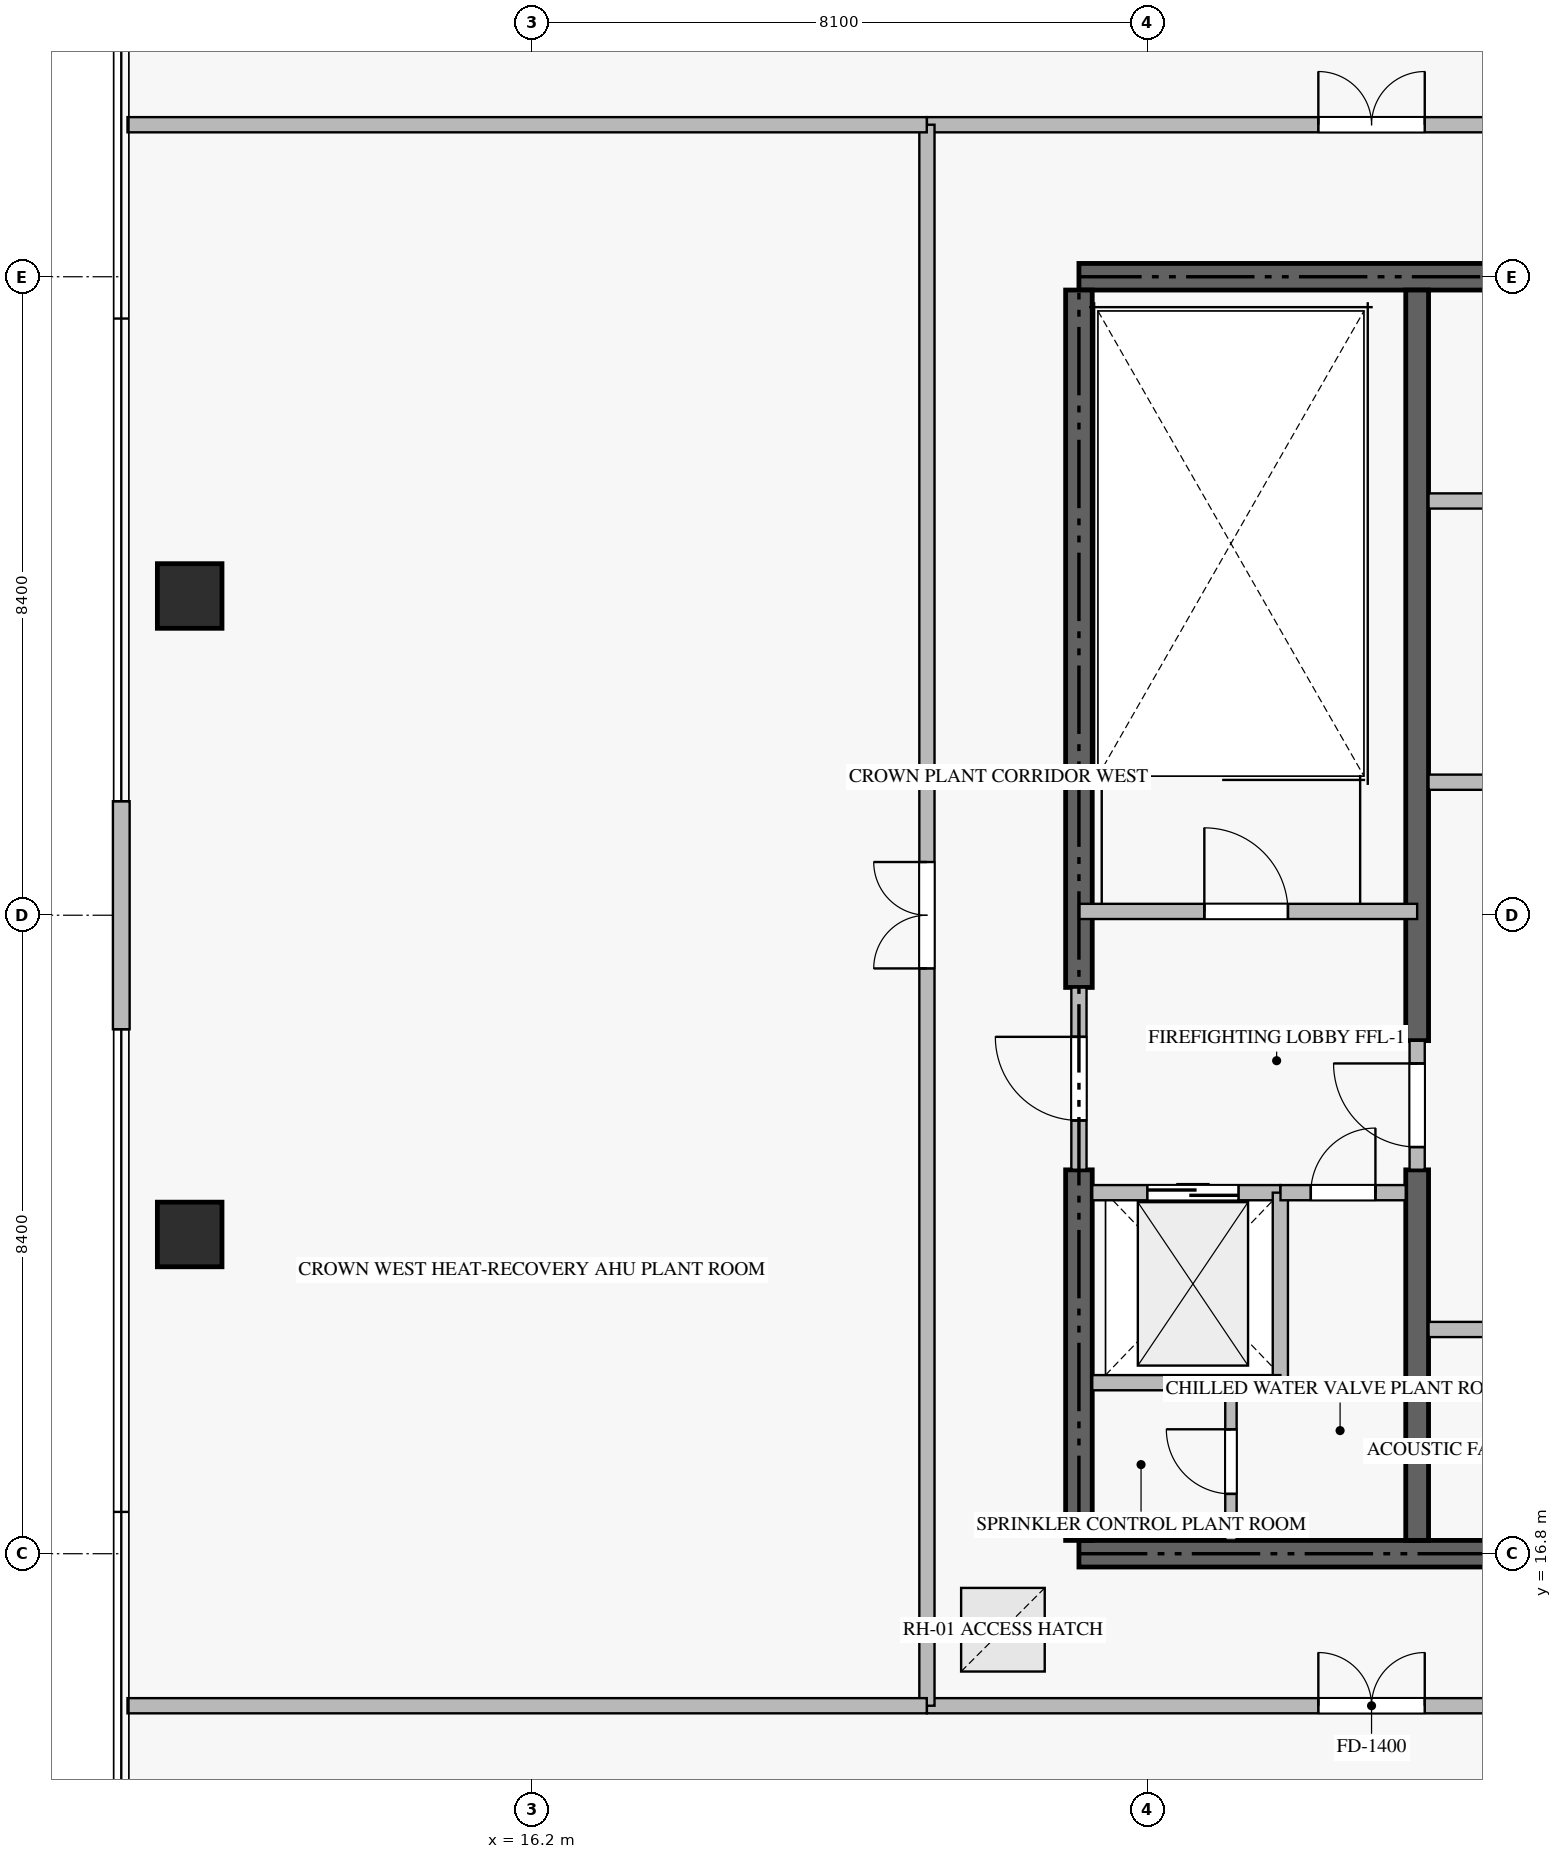
"""IFC4 building model, lengths in metres.
Left out: names, types, materials, properties, quantities, classifications, styles, units other than length and angle.
Written with IfcOpenShell. Run it as: python <this file> out.ifc"""

import sys

from ifc_helpers import new_model, si_unit, direction, frame, frame_2d, origin, origin_2d, place, context, subcontext, project, spatial, rectangle, extrude, source, transform, mapped, element, fill, save


model = new_model("IFC4")
c1 = context("Model", 3, precision=1e-05, world=origin(), true_north=direction((0.0, 1.0)))
c2 = subcontext(c1, "Body", "Model", "MODEL_VIEW")
j1 = project(units=[si_unit("LENGTHUNIT", "METRE"), si_unit("PLANEANGLEUNIT", "RADIAN")], contexts=[c1])
p1 = place(None, origin())
s1 = spatial("IfcSite", under=j1, at=p1, CompositionType="ELEMENT")
p2 = place(p1, origin())
s2 = spatial("IfcBuilding", under=s1, at=p2, CompositionType="ELEMENT")
p3 = place(p2, frame((0.0, 0.0, 365.75)))
s3 = spatial("IfcBuildingStorey", under=s2, at=p3, CompositionType="ELEMENT", Elevation=365.75)
for number, where, z_axis, x_axis in (
    (1, (23.4, 16.8, -0.36), (0.0, 0.0, 1.0), (1.0, 0.0, 0.0)),
    (2, (41.4, 33.6, -0.36), (0.0, 0.0, 1.0), (-1.0, 0.0, 0.0)),
):
    element("IfcWall", number, at=place(p3, frame(where, z_axis=z_axis, x_axis=x_axis)), inside=s3, PredefinedType="SHEAR", context=c2, shape_type="SweptSolid", body=[
        extrude(rectangle(XDim=18.0, YDim=0.35, at=frame_2d((9.0, 0.0))), origin(), (0.0, 0.0, 1.0), 5.258),
    ])
p4 = place(p3, frame((23.4, 16.975, -0.36), z_axis=(0.0, 0.0, 1.0), x_axis=(0.0, 1.0, 0.0)))
e3 = element("IfcWall", 3, at=p4, inside=s3, PredefinedType="SHEAR", context=c2, shape_type="SweptSolid", body=[
    extrude(rectangle(XDim=4.875, YDim=0.35, at=frame_2d((2.438, 0.0))), origin(), (0.0, 0.0, 1.0), 5.258),
])
p5 = place(p3, frame((23.4, 24.25, -0.36), z_axis=(0.0, 0.0, 1.0), x_axis=(0.0, 1.0, 0.0)))
e4 = element("IfcWall", 4, at=p5, inside=s3, PredefinedType="SHEAR", context=c2, shape_type="SweptSolid", body=[
    extrude(rectangle(XDim=9.175, YDim=0.35, at=frame_2d((4.587, 0.0))), origin(), (0.0, 0.0, 1.0), 5.258),
])
p6 = place(p3, frame((27.85, 16.975, -0.36), z_axis=(0.0, 0.0, 1.0), x_axis=(0.0, 1.0, 0.0)))
e5 = element("IfcWall", 5, at=p6, inside=s3, PredefinedType="SHEAR", context=c2, shape_type="SweptSolid", body=[
    extrude(rectangle(XDim=4.875, YDim=0.3, at=frame_2d((2.438, 0.0))), origin(), (0.0, 0.0, 1.0), 5.258),
])
p7 = place(p3, frame((27.85, 23.55, -0.36), z_axis=(0.0, 0.0, 1.0), x_axis=(0.0, 1.0, 0.0)))
e6 = element("IfcWall", 6, at=p7, inside=s3, PredefinedType="SHEAR", context=c2, shape_type="SweptSolid", body=[
    extrude(rectangle(XDim=9.875, YDim=0.3, at=frame_2d((4.938, 0.0))), origin(), (0.0, 0.0, 1.0), 5.258),
])
m1 = source(origin(), c2, "Body", "SweptSolid", [
    extrude(rectangle(XDim=0.85, YDim=0.85, at=origin_2d()), origin(), (0.0, 0.0, 1.0), 5.26),
])
for number, where, z_axis, x_axis in (
    (7, (11.7, 21.0, -0.36), (0.0, 0.0, 1.0), (1.0, 0.0, 0.0)),
    (8, (11.7, 29.4, -0.36), (0.0, 0.0, 1.0), (1.0, 0.0, 0.0)),
):
    element("IfcColumn", number, at=place(p3, frame(where, z_axis=z_axis, x_axis=x_axis)), inside=s3, PredefinedType="COLUMN", context=c2, shape_type="MappedRepresentation", body=[
        mapped(m1, transform((0.0, 0.0, 0.0), scale=1.0)),
    ])
p8 = place(p3, frame((10.8, 26.7, 0.0), z_axis=(0.0, 0.0, 1.0), x_axis=(0.0, -1.0, 0.0)))
e9 = element("IfcWall", 9, at=p8, inside=s3, PredefinedType="ELEMENTEDWALL", context=c2, shape_type="SweptSolid", body=[
    extrude(rectangle(XDim=3.0, YDim=0.22, at=frame_2d((1.5, 0.0))), origin(), (0.0, 0.0, 1.0), 4.885),
])
p9 = place(p3, frame((23.4, 25.25, 0.0), z_axis=(0.0, 0.0, 1.0), x_axis=(1.0, 0.0, 0.0)))
e10 = element("IfcWall", 10, at=p9, inside=s3, PredefinedType="STANDARD", context=c2, shape_type="SweptSolid", body=[
    extrude(rectangle(XDim=4.45, YDim=0.2, at=frame_2d((2.225, 0.0))), origin(), (0.0, 0.0, 1.0), 4.9),
])
p10 = place(p9, frame((1.65, 0.0, 0.0)))
e11 = element("IfcOpeningElement", 11, at=p10, cuts=e10, PredefinedType="OPENING", context=c2, shape_type="SweptSolid", body=[
    extrude(rectangle(XDim=1.1, YDim=2.15, at=frame_2d((0.55, 1.075))), frame((0.0, 0.11, 0.0), z_axis=(0.0, -1.0, 0.0), x_axis=(1.0, 0.0, 0.0)), (0.0, 0.0, 1.0), 0.22),
])
p11 = place(p3, frame((23.575, 21.55, 0.0), z_axis=(0.0, 0.0, 1.0), x_axis=(1.0, 0.0, 0.0)))
e12 = element("IfcWall", 12, at=p11, inside=s3, PredefinedType="STANDARD", context=c2, shape_type="SweptSolid", body=[
    extrude(rectangle(XDim=2.475, YDim=0.2, at=frame_2d((1.238, 0.0))), origin(), (0.0, 0.0, 1.0), 4.9),
])
p12 = place(p11, frame((0.725, 0.0, 0.0)))
e13 = element("IfcOpeningElement", 13, at=p12, cuts=e12, PredefinedType="OPENING", context=c2, shape_type="SweptSolid", body=[
    extrude(rectangle(XDim=1.2, YDim=2.2, at=frame_2d((0.6, 1.1))), frame((0.0, 0.11, 0.0), z_axis=(0.0, -1.0, 0.0), x_axis=(1.0, 0.0, 0.0)), (0.0, 0.0, 1.0), 0.22),
])
p13 = place(p3, frame((26.05, 19.05, 0.0), z_axis=(0.0, 0.0, 1.0), x_axis=(0.0, 1.0, 0.0)))
e14 = element("IfcWall", 14, at=p13, inside=s3, PredefinedType="STANDARD", context=c2, shape_type="SweptSolid", body=[
    extrude(rectangle(XDim=2.5, YDim=0.2, at=frame_2d((1.25, 0.0))), origin(), (0.0, 0.0, 1.0), 4.9),
])
p14 = place(p3, frame((23.575, 19.05, 0.0), z_axis=(0.0, 0.0, 1.0), x_axis=(1.0, 0.0, 0.0)))
e15 = element("IfcWall", 15, at=p14, inside=s3, PredefinedType="STANDARD", context=c2, shape_type="SweptSolid", body=[
    extrude(rectangle(XDim=2.475, YDim=0.2, at=frame_2d((1.238, 0.0))), origin(), (0.0, 0.0, 1.0), 4.9),
])
p15 = place(p3, frame((26.052, 21.55, 0.0), z_axis=(0.0, 0.0, 1.0), x_axis=(1.0, 0.0, 0.0)))
e16 = element("IfcWall", 16, at=p15, inside=s3, PredefinedType="STANDARD", context=c2, shape_type="SweptSolid", body=[
    extrude(rectangle(XDim=1.648, YDim=0.2, at=frame_2d((0.824, 0.0))), origin(), (0.0, 0.0, 1.0), 4.9),
])
p16 = place(p15, frame((0.399, 0.0, 0.0)))
e17 = element("IfcOpeningElement", 17, at=p16, cuts=e16, PredefinedType="OPENING", context=c2, shape_type="SweptSolid", body=[
    extrude(rectangle(XDim=0.85, YDim=2.1, at=frame_2d((0.425, 1.05))), frame((0.0, 0.11, 0.0), z_axis=(0.0, -1.0, 0.0), x_axis=(1.0, 0.0, 0.0)), (0.0, 0.0, 1.0), 0.22),
])
p17 = place(p3, frame((23.4, 21.852, 0.0), z_axis=(0.0, 0.0, 1.0), x_axis=(0.0, 1.0, 0.0)))
e18 = element("IfcWall", 18, at=p17, inside=s3, PredefinedType="STANDARD", context=c2, shape_type="SweptSolid", body=[
    extrude(rectangle(XDim=2.396, YDim=0.2, at=frame_2d((1.198, 0.0))), origin(), (0.0, 0.0, 1.0), 4.9),
])
p18 = place(p17, frame((0.648, 0.0, 0.0)))
e19 = element("IfcOpeningElement", 19, at=p18, cuts=e18, PredefinedType="OPENING", context=c2, shape_type="SweptSolid", body=[
    extrude(rectangle(XDim=1.1, YDim=2.15, at=frame_2d((0.55, 1.075))), frame((0.0, 0.11, 0.0), z_axis=(0.0, -1.0, 0.0), x_axis=(1.0, 0.0, 0.0)), (0.0, 0.0, 1.0), 0.22),
])
p19 = place(p3, frame((27.85, 21.852, 0.0), z_axis=(0.0, 0.0, 1.0), x_axis=(0.0, 1.0, 0.0)))
e20 = element("IfcWall", 20, at=p19, inside=s3, PredefinedType="STANDARD", context=c2, shape_type="SweptSolid", body=[
    extrude(rectangle(XDim=1.696, YDim=0.2, at=frame_2d((0.848, 0.0))), origin(), (0.0, 0.0, 1.0), 4.9),
])
p20 = place(p19, frame((0.298, 0.0, 0.0)))
e21 = element("IfcOpeningElement", 21, at=p20, cuts=e20, PredefinedType="OPENING", context=c2, shape_type="SweptSolid", body=[
    extrude(rectangle(XDim=1.1, YDim=2.15, at=frame_2d((0.55, 1.075))), frame((0.0, 0.11, 0.0), z_axis=(0.0, -1.0, 0.0), x_axis=(1.0, 0.0, 0.0)), (0.0, 0.0, 1.0), 0.22),
])
p21 = place(p3, frame((28.0, 30.65, 0.0), z_axis=(0.0, 0.0, 1.0), x_axis=(1.0, 0.0, 0.0)))
e22 = element("IfcWall", 22, at=p21, inside=s3, PredefinedType="STANDARD", context=c2, shape_type="SweptSolid", body=[
    extrude(rectangle(XDim=6.998, YDim=0.2, at=frame_2d((3.499, 0.0))), origin(), (0.0, 0.0, 1.0), 4.9),
])
p22 = place(p3, frame((25.4, 16.975, 0.0), z_axis=(0.0, 0.0, 1.0), x_axis=(0.0, 1.0, 0.0)))
e23 = element("IfcWall", 23, at=p22, inside=s3, PredefinedType="PARTITIONING", context=c2, shape_type="SweptSolid", body=[
    extrude(rectangle(XDim=2.075, YDim=0.15, at=frame_2d((1.038, 0.0))), origin(), (0.0, 0.0, 1.0), 4.9),
])
p23 = place(p22, frame((0.612, 0.0, 0.0)))
e24 = element("IfcOpeningElement", 24, at=p23, cuts=e23, PredefinedType="OPENING", context=c2, shape_type="SweptSolid", body=[
    extrude(rectangle(XDim=0.85, YDim=2.1, at=frame_2d((0.425, 1.05))), frame((0.0, 0.085, 0.0), z_axis=(0.0, -1.0, 0.0), x_axis=(1.0, 0.0, 0.0)), (0.0, 0.0, 1.0), 0.17),
])
p24 = place(p3, frame((28.0, 19.75, 0.0), z_axis=(0.0, 0.0, 1.0), x_axis=(1.0, 0.0, 0.0)))
e25 = element("IfcWall", 25, at=p24, inside=s3, PredefinedType="STANDARD", context=c2, shape_type="SweptSolid", body=[
    extrude(rectangle(XDim=4.4, YDim=0.2, at=frame_2d((2.2, 0.0))), origin(), (0.0, 0.0, 1.0), 4.9),
])
p25 = place(p24, frame((1.75, 0.0, 0.0)))
e26 = element("IfcOpeningElement", 26, at=p25, cuts=e25, PredefinedType="OPENING", context=c2, shape_type="SweptSolid", body=[
    extrude(rectangle(XDim=0.9, YDim=2.1, at=frame_2d((0.45, 1.05))), frame((0.0, 0.11, 0.0), z_axis=(0.0, -1.0, 0.0), x_axis=(1.0, 0.0, 0.0)), (0.0, 0.0, 1.0), 0.22),
])
p26 = place(p3, frame((28.0, 26.95, 0.0), z_axis=(0.0, 0.0, 1.0), x_axis=(1.0, 0.0, 0.0)))
e27 = element("IfcWall", 27, at=p26, inside=s3, PredefinedType="STANDARD", context=c2, shape_type="SweptSolid", body=[
    extrude(rectangle(XDim=6.95, YDim=0.2, at=frame_2d((3.475, 0.0))), origin(), (0.0, 0.0, 1.0), 4.9),
])
p27 = place(p3, frame((21.4, 14.8, 0.0), z_axis=(0.0, 0.0, 1.0), x_axis=(1.0, 0.0, 0.0)))
e28 = element("IfcWall", 28, at=p27, inside=s3, PredefinedType="STANDARD", context=c2, shape_type="SweptSolid", body=[
    extrude(rectangle(XDim=22.0, YDim=0.2, at=frame_2d((11.0, 0.0))), origin(), (0.0, 0.0, 1.0), 4.9),
])
p28 = place(p27, frame((5.15, 0.0, 0.0)))
e29 = element("IfcOpeningElement", 29, at=p28, cuts=e28, PredefinedType="OPENING", context=c2, shape_type="SweptSolid", body=[
    extrude(rectangle(XDim=1.4, YDim=2.2, at=frame_2d((0.7, 1.1))), frame((0.0, 0.11, 0.0), z_axis=(0.0, -1.0, 0.0), x_axis=(1.0, 0.0, 0.0)), (0.0, 0.0, 1.0), 0.22),
])
p29 = place(p27, frame((15.45, 0.0, 0.0)))
e30 = element("IfcOpeningElement", 30, at=p29, cuts=e28, PredefinedType="OPENING", context=c2, shape_type="SweptSolid", body=[
    extrude(rectangle(XDim=1.4, YDim=2.2, at=frame_2d((0.7, 1.1))), frame((0.0, 0.11, 0.0), z_axis=(0.0, -1.0, 0.0), x_axis=(1.0, 0.0, 0.0)), (0.0, 0.0, 1.0), 0.22),
])
p30 = place(p3, frame((21.4, 35.6, 0.0), z_axis=(0.0, 0.0, 1.0), x_axis=(1.0, 0.0, 0.0)))
e31 = element("IfcWall", 31, at=p30, inside=s3, PredefinedType="STANDARD", context=c2, shape_type="SweptSolid", body=[
    extrude(rectangle(XDim=22.0, YDim=0.2, at=frame_2d((11.0, 0.0))), origin(), (0.0, 0.0, 1.0), 4.9),
])
p31 = place(p30, frame((5.15, 0.0, 0.0)))
e32 = element("IfcOpeningElement", 32, at=p31, cuts=e31, PredefinedType="OPENING", context=c2, shape_type="SweptSolid", body=[
    extrude(rectangle(XDim=1.4, YDim=2.2, at=frame_2d((0.7, 1.1))), frame((0.0, 0.11, 0.0), z_axis=(0.0, -1.0, 0.0), x_axis=(1.0, 0.0, 0.0)), (0.0, 0.0, 1.0), 0.22),
])
p32 = place(p30, frame((15.45, 0.0, 0.0)))
e33 = element("IfcOpeningElement", 33, at=p32, cuts=e31, PredefinedType="OPENING", context=c2, shape_type="SweptSolid", body=[
    extrude(rectangle(XDim=1.4, YDim=2.2, at=frame_2d((0.7, 1.1))), frame((0.0, 0.11, 0.0), z_axis=(0.0, -1.0, 0.0), x_axis=(1.0, 0.0, 0.0)), (0.0, 0.0, 1.0), 0.22),
])
p33 = place(p3, frame((21.4, 14.8, 0.0), z_axis=(0.0, 0.0, 1.0), x_axis=(0.0, 1.0, 0.0)))
e34 = element("IfcWall", 34, at=p33, inside=s3, PredefinedType="STANDARD", context=c2, shape_type="SweptSolid", body=[
    extrude(rectangle(XDim=20.8, YDim=0.2, at=frame_2d((10.4, 0.0))), origin(), (0.0, 0.0, 1.0), 4.9),
])
p34 = place(p33, frame((9.7, 0.0, 0.0)))
e35 = element("IfcOpeningElement", 35, at=p34, cuts=e34, PredefinedType="OPENING", context=c2, shape_type="SweptSolid", body=[
    extrude(rectangle(XDim=1.4, YDim=2.2, at=frame_2d((0.7, 1.1))), frame((0.0, 0.11, 0.0), z_axis=(0.0, -1.0, 0.0), x_axis=(1.0, 0.0, 0.0)), (0.0, 0.0, 1.0), 0.22),
])
for number, where, z_axis, x_axis in (
    (36, (10.882, 14.8, 0.0), (0.0, 0.0, 1.0), (1.0, 0.0, 0.0)),
    (37, (10.882, 35.6, 0.0), (0.0, 0.0, 1.0), (1.0, 0.0, 0.0)),
):
    element("IfcWall", number, at=place(p3, frame(where, z_axis=z_axis, x_axis=x_axis)), inside=s3, PredefinedType="STANDARD", context=c2, shape_type="SweptSolid", body=[
        extrude(rectangle(XDim=10.516, YDim=0.2, at=frame_2d((5.258, 0.0))), origin(), (0.0, 0.0, 1.0), 4.9),
    ])
p35 = place(p2, frame((0.0, 0.0, 370.95)))
p36 = place(p35, frame((0.0, 0.0, -0.3)))
p37 = place(p36, frame((22.4, 15.8, 0.0)))
p38 = place(p37, frame((0.0, 0.0, 0.26)))
e38 = element("IfcDoor", 38, at=p38, inside=s3, OperationType="SINGLE_SWING_LEFT", PredefinedType="TRAPDOOR", context=c2, shape_type="SweptSolid", body=[
    extrude(rectangle(XDim=1.1, YDim=1.1, at=origin_2d()), origin(), (0.0, 0.0, 1.0), 0.04),
])
m2 = source(origin(), c2, "Body", "SweptSolid", [
    extrude(rectangle(XDim=1.1, YDim=2.15, at=frame_2d((0.55, 1.075))), frame((0.0, 0.025, 0.0), z_axis=(0.0, -1.0, 0.0), x_axis=(1.0, 0.0, 0.0)), (0.0, 0.0, 1.0), 0.05),
])
p39 = place(p10, origin())
e39 = element("IfcDoor", 39, at=p39, inside=s3, OperationType="SINGLE_SWING_LEFT", PredefinedType="DOOR", context=c2, shape_type="MappedRepresentation", body=[
    mapped(m2, transform((0.0, 0.0, 0.0), scale=1.0)),
])
fill(e11, e39)
m3 = source(origin(), c2, "Body", "SweptSolid", [
    extrude(rectangle(XDim=1.2, YDim=2.2, at=frame_2d((0.6, 1.1))), frame((0.0, 0.025, 0.0), z_axis=(0.0, -1.0, 0.0), x_axis=(1.0, 0.0, 0.0)), (0.0, 0.0, 1.0), 0.05),
])
p40 = place(p12, origin())
e40 = element("IfcDoor", 40, at=p40, inside=s3, OperationType="DOUBLE_DOOR_SLIDING", PredefinedType="DOOR", context=c2, shape_type="MappedRepresentation", body=[
    mapped(m3, transform((0.0, 0.0, 0.0), scale=1.0)),
])
fill(e13, e40)
m4 = source(origin(), c2, "Body", "SweptSolid", [
    extrude(rectangle(XDim=0.85, YDim=2.1, at=frame_2d((0.425, 1.05))), frame((0.0, 0.025, 0.0), z_axis=(0.0, -1.0, 0.0), x_axis=(1.0, 0.0, 0.0)), (0.0, 0.0, 1.0), 0.05),
])
p41 = place(p16, origin())
e41 = element("IfcDoor", 41, at=p41, inside=s3, OperationType="SINGLE_SWING_RIGHT", PredefinedType="DOOR", context=c2, shape_type="MappedRepresentation", body=[
    mapped(m4, transform((0.0, 0.0, 0.0), scale=1.0)),
])
fill(e17, e41)
p42 = place(p18, origin())
e42 = element("IfcDoor", 42, at=p42, inside=s3, OperationType="SINGLE_SWING_RIGHT", PredefinedType="DOOR", context=c2, shape_type="MappedRepresentation", body=[
    mapped(m2, transform((0.0, 0.0, 0.0), scale=1.0)),
])
fill(e19, e42)
p43 = place(p20, origin())
e43 = element("IfcDoor", 43, at=p43, inside=s3, OperationType="SINGLE_SWING_RIGHT", PredefinedType="DOOR", context=c2, shape_type="MappedRepresentation", body=[
    mapped(m2, transform((0.0, 0.0, 0.0), scale=1.0)),
])
fill(e21, e43)
p44 = place(p23, origin())
e44 = element("IfcDoor", 44, at=p44, inside=s3, OperationType="SINGLE_SWING_RIGHT", PredefinedType="DOOR", context=c2, shape_type="MappedRepresentation", body=[
    mapped(m4, transform((0.0, 0.0, 0.0), scale=1.0)),
])
fill(e24, e44)
m5 = source(origin(), c2, "Body", "SweptSolid", [
    extrude(rectangle(XDim=1.4, YDim=2.2, at=frame_2d((0.7, 1.1))), frame((0.0, 0.025, 0.0), z_axis=(0.0, -1.0, 0.0), x_axis=(1.0, 0.0, 0.0)), (0.0, 0.0, 1.0), 0.05),
])
p45 = place(p28, origin())
e45 = element("IfcDoor", 45, at=p45, inside=s3, OperationType="DOUBLE_DOOR_SINGLE_SWING", PredefinedType="DOOR", context=c2, shape_type="MappedRepresentation", body=[
    mapped(m5, transform((0.0, 0.0, 0.0), scale=1.0)),
])
fill(e29, e45)
p46 = place(p31, origin())
e46 = element("IfcDoor", 46, at=p46, inside=s3, OperationType="DOUBLE_DOOR_SINGLE_SWING", PredefinedType="DOOR", context=c2, shape_type="MappedRepresentation", body=[
    mapped(m5, transform((0.0, 0.0, 0.0), scale=1.0)),
])
fill(e32, e46)
p47 = place(p34, origin())
e47 = element("IfcDoor", 47, at=p47, inside=s3, OperationType="DOUBLE_DOOR_SINGLE_SWING", PredefinedType="DOOR", context=c2, shape_type="MappedRepresentation", body=[
    mapped(m5, transform((0.0, 0.0, 0.0), scale=1.0)),
])
fill(e35, e47)
save(model, sys.argv[1])
